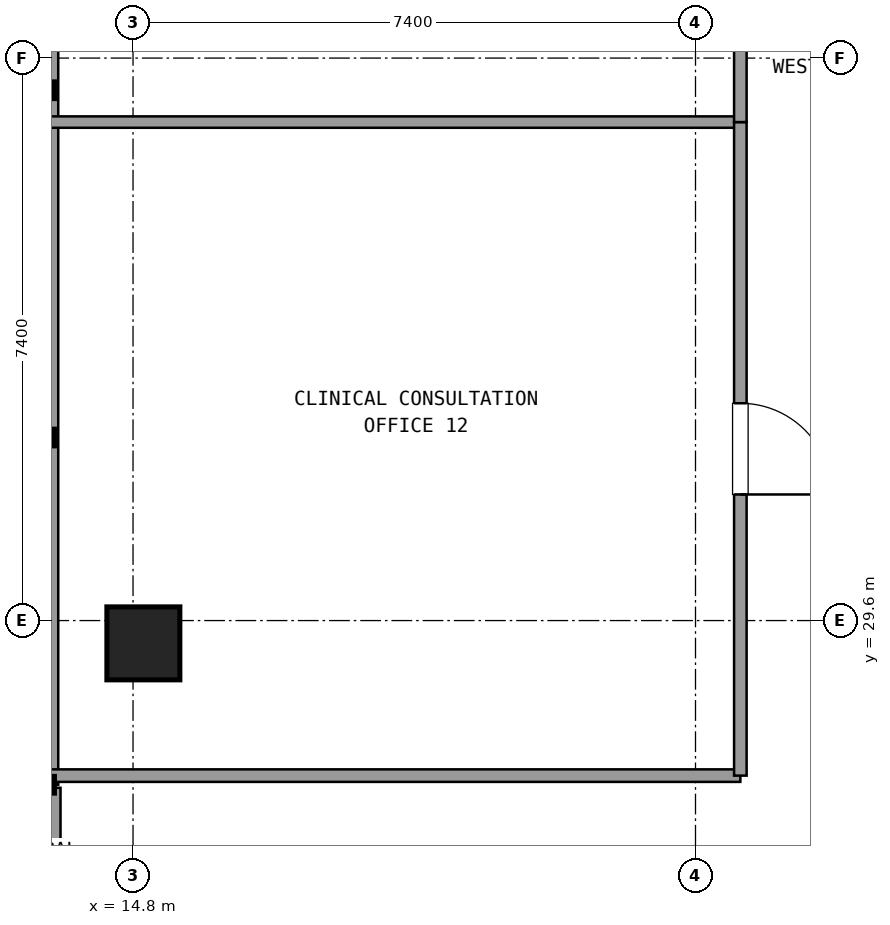
"""IFC4 building model, lengths in metres.
Left out: names, types, materials, properties, quantities, classifications, styles, units other than length and angle.
Written with IfcOpenShell. Run it as: python <this file> out.ifc"""

import sys

from ifc_helpers import new_model, si_unit, direction, frame, frame_2d, origin, origin_2d, place, context, subcontext, project, spatial, rectangle, extrude, element, fill, save


model = new_model("IFC4")
c1 = context("Model", 3, precision=1e-05, world=origin(), true_north=direction((0.0, 1.0)))
c2 = subcontext(c1, "Body", "Model", "MODEL_VIEW")
j1 = project(units=[si_unit("LENGTHUNIT", "METRE"), si_unit("PLANEANGLEUNIT", "RADIAN")], contexts=[c1])
p1 = place(None, origin())
s1 = spatial("IfcSite", under=j1, at=p1, CompositionType="ELEMENT")
p2 = place(p1, origin())
s2 = spatial("IfcBuilding", under=s1, at=p2, CompositionType="ELEMENT")
p3 = place(p2, frame((0.0, 0.0, 156.42)))
s3 = spatial("IfcBuildingStorey", under=s2, at=p3, CompositionType="ELEMENT", Elevation=156.42)
p4 = place(p3, frame((14.936, 29.3, 0.0), z_axis=(0.0, 0.0, 1.0), x_axis=(1.0, 0.0, 0.0)))
e1 = element("IfcColumn", 1, at=p4, inside=s3, PredefinedType="COLUMN", context=c2, shape_type="SweptSolid", body=[
    extrude(rectangle(XDim=0.96, YDim=0.96, at=origin_2d()), origin(), (0.0, 0.0, 1.0), 3.6),
])
p5 = place(p3, frame((13.696, 27.4, 0.0), z_axis=(0.0, 0.0, 1.0), x_axis=(0.0, -1.0, 0.0)))
e2 = element("IfcWall", 2, at=p5, inside=s3, PredefinedType="SOLIDWALL", context=c2, shape_type="SweptSolid", body=[
    extrude(rectangle(XDim=3.0, YDim=0.3, at=frame_2d((1.5, 0.0))), origin(), (0.0, 0.0, 1.0), 2.67),
])
p6 = place(p5, frame((0.9, 0.0, 0.0)))
e3 = element("IfcOpeningElement", 3, at=p6, cuts=e2, PredefinedType="OPENING", context=c2, shape_type="SweptSolid", body=[
    extrude(rectangle(XDim=1.2, YDim=2.2, at=frame_2d((0.6, 1.1))), frame((0.0, 0.16, 0.0), z_axis=(0.0, -1.0, 0.0), x_axis=(1.0, 0.0, 0.0)), (0.0, 0.0, 1.0), 0.32),
])
p7 = place(p3, frame((13.696, 41.145, 0.0), z_axis=(0.0, 0.0, 1.0), x_axis=(0.0, -1.0, 0.0)))
e4 = element("IfcWall", 4, at=p7, inside=s3, PredefinedType="SOLIDWALL", context=c2, shape_type="SweptSolid", body=[
    extrude(rectangle(XDim=13.705, YDim=0.24, at=frame_2d((6.853, 0.0))), origin(), (0.0, 0.0, 1.0), 0.85),
])
p8 = place(p3, frame((13.716, 27.56, 0.0), z_axis=(0.0, 0.0, 1.0), x_axis=(1.0, 0.0, 0.0)))
e5 = element("IfcWall", 5, at=p8, inside=s3, PredefinedType="PARTITIONING", context=c2, shape_type="SweptSolid", body=[
    extrude(rectangle(XDim=9.074, YDim=0.165, at=frame_2d((4.537, 0.0))), origin(), (0.0, 0.0, 1.0), 2.61),
])
p9 = place(p3, frame((22.79, 36.158, 0.0), z_axis=(0.0, 0.0, 1.0), x_axis=(-1.0, 0.0, 0.0)))
e6 = element("IfcWall", 6, at=p9, inside=s3, PredefinedType="PARTITIONING", context=c2, shape_type="SweptSolid", body=[
    extrude(rectangle(XDim=9.074, YDim=0.15, at=frame_2d((4.537, 0.0))), origin(), (0.0, 0.0, 1.0), 2.61),
])
p10 = place(p3, frame((22.79, 27.56, 0.0), z_axis=(0.0, 0.0, 1.0), x_axis=(0.0, 1.0, 0.0)))
e7 = element("IfcWall", 7, at=p10, inside=s3, PredefinedType="PARTITIONING", context=c2, shape_type="SweptSolid", body=[
    extrude(rectangle(XDim=8.598, YDim=0.165, at=frame_2d((4.299, 0.0))), origin(), (0.0, 0.0, 1.0), 2.61),
])
p11 = place(p10, frame((3.699, 0.0, 0.0)))
e8 = element("IfcOpeningElement", 8, at=p11, cuts=e7, PredefinedType="OPENING", context=c2, shape_type="SweptSolid", body=[
    extrude(rectangle(XDim=1.2, YDim=2.15, at=frame_2d((0.6, 1.075))), frame((0.0, 0.093, 0.0), z_axis=(0.0, -1.0, 0.0), x_axis=(1.0, 0.0, 0.0)), (0.0, 0.0, 1.0), 0.185),
])
p12 = place(p3, frame((22.79, 36.158, 0.0), z_axis=(0.0, 0.0, 1.0), x_axis=(0.0, 1.0, 0.0)))
e9 = element("IfcWall", 9, at=p12, inside=s3, PredefinedType="PARTITIONING", context=c2, shape_type="SweptSolid", body=[
    extrude(rectangle(XDim=10.942, YDim=0.165, at=frame_2d((5.471, 0.0))), origin(), (0.0, 0.0, 1.0), 2.61),
])
p13 = place(p12, frame((4.871, 0.0, 0.0)))
e10 = element("IfcOpeningElement", 10, at=p13, cuts=e9, PredefinedType="OPENING", context=c2, shape_type="SweptSolid", body=[
    extrude(rectangle(XDim=1.2, YDim=2.15, at=frame_2d((0.6, 1.075))), frame((0.0, 0.093, 0.0), z_axis=(0.0, -1.0, 0.0), x_axis=(1.0, 0.0, 0.0)), (0.0, 0.0, 1.0), 0.185),
])
p14 = place(p11, frame((1.2, 0.0, 0.0), z_axis=(0.0, 0.0, 1.0), x_axis=(-1.0, 0.0, 0.0)))
e11 = element("IfcDoor", 11, at=p14, inside=s3, OperationType="SINGLE_SWING_LEFT", PredefinedType="DOOR", context=c2, shape_type="SweptSolid", body=[
    extrude(rectangle(XDim=1.2, YDim=2.15, at=frame_2d((0.6, 1.075))), frame((0.0, 0.025, 0.0), z_axis=(0.0, -1.0, 0.0), x_axis=(1.0, 0.0, 0.0)), (0.0, 0.0, 1.0), 0.05),
])
fill(e8, e11)
save(model, sys.argv[1])
